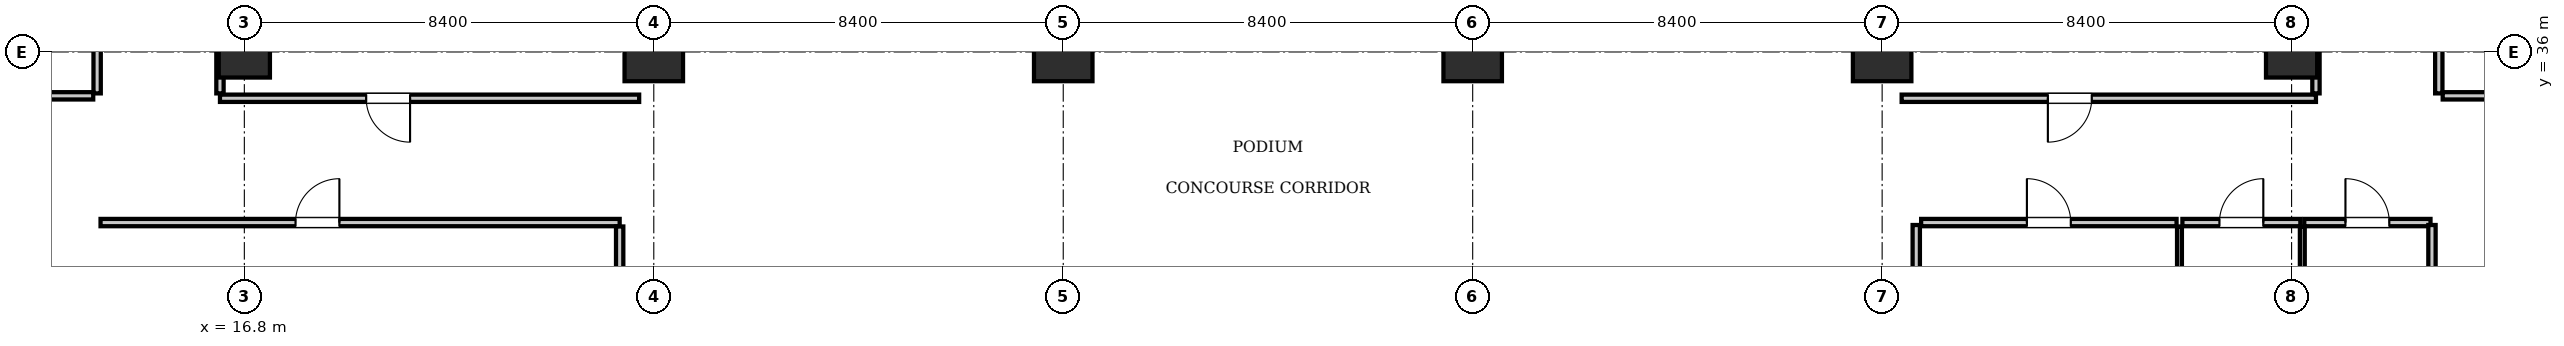
"""IFC4 building model, lengths in metres.
Left out: names, types, materials, properties, quantities, classifications, styles, units other than length and angle.
Written with IfcOpenShell. Run it as: python <this file> out.ifc"""

import sys

from ifc_helpers import new_model, si_unit, direction, frame, frame_2d, origin, origin_2d, place, context, subcontext, project, spatial, rectangle, extrude, element, fill, save


model = new_model("IFC4")
c1 = context("Model", 3, precision=1e-05, world=origin(), true_north=direction((0.0, 1.0)))
c2 = subcontext(c1, "Body", "Model", "MODEL_VIEW")
j1 = project(units=[si_unit("LENGTHUNIT", "METRE"), si_unit("PLANEANGLEUNIT", "RADIAN")], contexts=[c1])
p1 = place(None, origin())
s1 = spatial("IfcSite", under=j1, at=p1, CompositionType="ELEMENT")
p2 = place(p1, origin())
s2 = spatial("IfcBuilding", under=s1, at=p2, CompositionType="ELEMENT")
p3 = place(p2, frame((0.0, 0.0, 5.6)))
s3 = spatial("IfcBuildingStorey", under=s2, at=p3, CompositionType="ELEMENT", Elevation=5.6)
for number, where, z_axis, x_axis in (
    (1, (25.2, 36.0, 0.0), (0.0, 0.0, 1.0), (1.0, 0.0, 0.0)),
    (2, (33.6, 36.0, 0.0), (0.0, 0.0, 1.0), (1.0, 0.0, 0.0)),
    (3, (42.0, 36.0, 0.0), (0.0, 0.0, 1.0), (1.0, 0.0, 0.0)),
    (4, (50.4, 36.0, 0.0), (0.0, 0.0, 1.0), (1.0, 0.0, 0.0)),
):
    element("IfcColumn", number, at=place(p3, frame(where, z_axis=z_axis, x_axis=x_axis)), inside=s3, PredefinedType="COLUMN", context=c2, shape_type="SweptSolid", body=[
        extrude(rectangle(XDim=1.2, YDim=1.2, at=origin_2d()), origin(), (0.0, 0.0, 1.0), 5.25),
    ])
for number, where, z_axis, x_axis in (
    (5, (16.8, 36.0, 0.0), (0.0, 0.0, 1.0), (1.0, 0.0, 0.0)),
    (6, (58.8, 36.0, 0.0), (0.0, 0.0, 1.0), (1.0, 0.0, 0.0)),
):
    element("IfcColumn", number, at=place(p3, frame(where, z_axis=z_axis, x_axis=x_axis)), inside=s3, PredefinedType="COLUMN", context=c2, shape_type="SweptSolid", body=[
        extrude(rectangle(XDim=1.05, YDim=1.05, at=origin_2d()), origin(), (0.0, 0.0, 1.0), 5.25),
    ])
p4 = place(p3, frame((13.85, 32.5, 0.0), z_axis=(0.0, 0.0, 1.0), x_axis=(1.0, 0.0, 0.0)))
e7 = element("IfcWall", 7, at=p4, inside=s3, PredefinedType="PARTITIONING", context=c2, shape_type="SweptSolid", body=[
    extrude(rectangle(XDim=10.65, YDim=0.15, at=frame_2d((5.325, 0.0))), origin(), (0.0, 0.0, 1.0), 4.97),
])
p5 = place(p4, frame((4.0, 0.0, 0.0)))
e8 = element("IfcOpeningElement", 8, at=p5, cuts=e7, PredefinedType="OPENING", context=c2, shape_type="SweptSolid", body=[
    extrude(rectangle(XDim=0.9, YDim=2.1, at=frame_2d((0.45, 1.05))), frame((0.0, 0.085, 0.0), z_axis=(0.0, -1.0, 0.0), x_axis=(1.0, 0.0, 0.0)), (0.0, 0.0, 1.0), 0.17),
])
p6 = place(p3, frame((24.5, 18.1, 0.0), z_axis=(0.0, 0.0, 1.0), x_axis=(0.0, 1.0, 0.0)))
e9 = element("IfcWall", 9, at=p6, inside=s3, PredefinedType="PARTITIONING", context=c2, shape_type="SweptSolid", body=[
    extrude(rectangle(XDim=14.32, YDim=0.15, at=frame_2d((7.16, 0.0))), origin(), (0.0, 0.0, 1.0), 4.97),
])
p7 = place(p3, frame((16.3, 35.05, 0.0), z_axis=(0.0, 0.0, 1.0), x_axis=(1.0, 0.0, 0.0)))
e10 = element("IfcWall", 10, at=p7, inside=s3, PredefinedType="PARTITIONING", context=c2, shape_type="SweptSolid", body=[
    extrude(rectangle(XDim=8.6, YDim=0.15, at=frame_2d((4.3, 0.0))), origin(), (0.0, 0.0, 1.0), 4.97),
])
p8 = place(p7, frame((3.0, 0.0, 0.0)))
e11 = element("IfcOpeningElement", 11, at=p8, cuts=e10, PredefinedType="OPENING", context=c2, shape_type="SweptSolid", body=[
    extrude(rectangle(XDim=0.9, YDim=2.1, at=frame_2d((0.45, 1.05))), frame((0.0, 0.085, 0.0), z_axis=(0.0, -1.0, 0.0), x_axis=(1.0, 0.0, 0.0)), (0.0, 0.0, 1.0), 0.17),
])
p9 = place(p3, frame((16.3, 35.15, 0.0), z_axis=(0.0, 0.0, 1.0), x_axis=(0.0, 1.0, 0.0)))
e12 = element("IfcWall", 12, at=p9, inside=s3, PredefinedType="PARTITIONING", context=c2, shape_type="SweptSolid", body=[
    extrude(rectangle(XDim=18.6, YDim=0.15, at=frame_2d((9.3, 0.0))), origin(), (0.0, 0.0, 1.0), 4.97),
])
p10 = place(p3, frame((13.78, 35.15, 0.0), z_axis=(0.0, 0.0, 1.0), x_axis=(0.0, 1.0, 0.0)))
e13 = element("IfcWall", 13, at=p10, inside=s3, PredefinedType="PARTITIONING", context=c2, shape_type="SweptSolid", body=[
    extrude(rectangle(XDim=9.7, YDim=0.15, at=frame_2d((4.85, 0.0))), origin(), (0.0, 0.0, 1.0), 4.97),
])
p11 = place(p10, frame((3.0, 0.0, 0.0)))
e14 = element("IfcOpeningElement", 14, at=p11, cuts=e13, PredefinedType="OPENING", context=c2, shape_type="SweptSolid", body=[
    extrude(rectangle(XDim=0.9, YDim=2.1, at=frame_2d((0.45, 1.05))), frame((0.0, 0.085, 0.0), z_axis=(0.0, -1.0, 0.0), x_axis=(1.0, 0.0, 0.0)), (0.0, 0.0, 1.0), 0.17),
])
p12 = place(p3, frame((4.35, 35.1, 0.0), z_axis=(0.0, 0.0, 1.0), x_axis=(1.0, 0.0, 0.0)))
e15 = element("IfcWall", 15, at=p12, inside=s3, PredefinedType="PARTITIONING", context=c2, shape_type="SweptSolid", body=[
    extrude(rectangle(XDim=9.35, YDim=0.15, at=frame_2d((4.675, 0.0))), origin(), (0.0, 0.0, 1.0), 4.97),
])
p13 = place(p3, frame((51.2, 32.5, 0.0), z_axis=(0.0, 0.0, 1.0), x_axis=(1.0, 0.0, 0.0)))
e16 = element("IfcWall", 16, at=p13, inside=s3, PredefinedType="PARTITIONING", context=c2, shape_type="SweptSolid", body=[
    extrude(rectangle(XDim=5.24, YDim=0.15, at=frame_2d((2.62, 0.0))), origin(), (0.0, 0.0, 1.0), 4.97),
])
p14 = place(p13, frame((2.17, 0.0, 0.0)))
e17 = element("IfcOpeningElement", 17, at=p14, cuts=e16, PredefinedType="OPENING", context=c2, shape_type="SweptSolid", body=[
    extrude(rectangle(XDim=0.9, YDim=2.1, at=frame_2d((0.45, 1.05))), frame((0.0, 0.085, 0.0), z_axis=(0.0, -1.0, 0.0), x_axis=(1.0, 0.0, 0.0)), (0.0, 0.0, 1.0), 0.17),
])
p15 = place(p3, frame((56.56, 32.5, 0.0), z_axis=(0.0, 0.0, 1.0), x_axis=(1.0, 0.0, 0.0)))
e18 = element("IfcWall", 18, at=p15, inside=s3, PredefinedType="PARTITIONING", context=c2, shape_type="SweptSolid", body=[
    extrude(rectangle(XDim=2.42, YDim=0.15, at=frame_2d((1.21, 0.0))), origin(), (0.0, 0.0, 1.0), 4.97),
])
p16 = place(p15, frame((0.76, 0.0, 0.0)))
e19 = element("IfcOpeningElement", 19, at=p16, cuts=e18, PredefinedType="OPENING", context=c2, shape_type="SweptSolid", body=[
    extrude(rectangle(XDim=0.9, YDim=2.1, at=frame_2d((0.45, 1.05))), frame((0.0, 0.085, 0.0), z_axis=(0.0, -1.0, 0.0), x_axis=(1.0, 0.0, 0.0)), (0.0, 0.0, 1.0), 0.17),
])
p17 = place(p3, frame((59.06, 32.5, 0.0), z_axis=(0.0, 0.0, 1.0), x_axis=(1.0, 0.0, 0.0)))
e20 = element("IfcWall", 20, at=p17, inside=s3, PredefinedType="PARTITIONING", context=c2, shape_type="SweptSolid", body=[
    extrude(rectangle(XDim=2.59, YDim=0.15, at=frame_2d((1.295, 0.0))), origin(), (0.0, 0.0, 1.0), 4.97),
])
p18 = place(p17, frame((0.845, 0.0, 0.0)))
e21 = element("IfcOpeningElement", 21, at=p18, cuts=e20, PredefinedType="OPENING", context=c2, shape_type="SweptSolid", body=[
    extrude(rectangle(XDim=0.9, YDim=2.1, at=frame_2d((0.45, 1.05))), frame((0.0, 0.085, 0.0), z_axis=(0.0, -1.0, 0.0), x_axis=(1.0, 0.0, 0.0)), (0.0, 0.0, 1.0), 0.17),
])
for number, where, z_axis, x_axis in (
    (22, (51.1, 26.18, 0.0), (0.0, 0.0, 1.0), (0.0, 1.0, 0.0)),
    (23, (61.68, 26.18, 0.0), (0.0, 0.0, 1.0), (0.0, 1.0, 0.0)),
):
    element("IfcWall", number, at=place(p3, frame(where, z_axis=z_axis, x_axis=x_axis)), inside=s3, PredefinedType="PARTITIONING", context=c2, shape_type="SweptSolid", body=[
        extrude(rectangle(XDim=6.27, YDim=0.15, at=frame_2d((3.135, 0.0))), origin(), (0.0, 0.0, 1.0), 4.97),
    ])
for number, where, z_axis, x_axis in (
    (24, (56.5, 26.18, 0.0), (0.0, 0.0, 1.0), (0.0, 1.0, 0.0)),
    (25, (59.02, 26.18, 0.0), (0.0, 0.0, 1.0), (0.0, 1.0, 0.0)),
):
    element("IfcWall", number, at=place(p3, frame(where, z_axis=z_axis, x_axis=x_axis)), inside=s3, PredefinedType="PARTITIONING", context=c2, shape_type="SweptSolid", body=[
        extrude(rectangle(XDim=6.24, YDim=0.1, at=frame_2d((3.12, 0.0))), origin(), (0.0, 0.0, 1.0), 4.97),
    ])
p19 = place(p3, frame((50.8, 35.05, 0.0), z_axis=(0.0, 0.0, 1.0), x_axis=(1.0, 0.0, 0.0)))
e26 = element("IfcWall", 26, at=p19, inside=s3, PredefinedType="PARTITIONING", context=c2, shape_type="SweptSolid", body=[
    extrude(rectangle(XDim=8.5, YDim=0.15, at=frame_2d((4.25, 0.0))), origin(), (0.0, 0.0, 1.0), 4.97),
])
p20 = place(p19, frame((3.0, 0.0, 0.0)))
e27 = element("IfcOpeningElement", 27, at=p20, cuts=e26, PredefinedType="OPENING", context=c2, shape_type="SweptSolid", body=[
    extrude(rectangle(XDim=0.9, YDim=2.1, at=frame_2d((0.45, 1.05))), frame((0.0, 0.085, 0.0), z_axis=(0.0, -1.0, 0.0), x_axis=(1.0, 0.0, 0.0)), (0.0, 0.0, 1.0), 0.17),
])
p21 = place(p3, frame((59.3, 35.15, 0.0), z_axis=(0.0, 0.0, 1.0), x_axis=(0.0, 1.0, 0.0)))
e28 = element("IfcWall", 28, at=p21, inside=s3, PredefinedType="PARTITIONING", context=c2, shape_type="SweptSolid", body=[
    extrude(rectangle(XDim=18.6, YDim=0.15, at=frame_2d((9.3, 0.0))), origin(), (0.0, 0.0, 1.0), 4.97),
])
p22 = place(p3, frame((61.82, 35.15, 0.0), z_axis=(0.0, 0.0, 1.0), x_axis=(0.0, 1.0, 0.0)))
e29 = element("IfcWall", 29, at=p22, inside=s3, PredefinedType="PARTITIONING", context=c2, shape_type="SweptSolid", body=[
    extrude(rectangle(XDim=9.7, YDim=0.15, at=frame_2d((4.85, 0.0))), origin(), (0.0, 0.0, 1.0), 4.97),
])
p23 = place(p22, frame((3.0, 0.0, 0.0)))
e30 = element("IfcOpeningElement", 30, at=p23, cuts=e29, PredefinedType="OPENING", context=c2, shape_type="SweptSolid", body=[
    extrude(rectangle(XDim=0.9, YDim=2.1, at=frame_2d((0.45, 1.05))), frame((0.0, 0.085, 0.0), z_axis=(0.0, -1.0, 0.0), x_axis=(1.0, 0.0, 0.0)), (0.0, 0.0, 1.0), 0.17),
])
p24 = place(p3, frame((61.9, 35.1, 0.0), z_axis=(0.0, 0.0, 1.0), x_axis=(1.0, 0.0, 0.0)))
e31 = element("IfcWall", 31, at=p24, inside=s3, PredefinedType="PARTITIONING", context=c2, shape_type="SweptSolid", body=[
    extrude(rectangle(XDim=9.35, YDim=0.15, at=frame_2d((4.675, 0.0))), origin(), (0.0, 0.0, 1.0), 4.97),
])
p25 = place(p5, origin())
e32 = element("IfcDoor", 32, at=p25, inside=s3, OperationType="SINGLE_SWING_RIGHT", PredefinedType="DOOR", context=c2, shape_type="SweptSolid", body=[
    extrude(rectangle(XDim=0.9, YDim=2.1, at=frame_2d((0.45, 1.05))), frame((0.0, 0.025, 0.0), z_axis=(0.0, -1.0, 0.0), x_axis=(1.0, 0.0, 0.0)), (0.0, 0.0, 1.0), 0.05),
])
fill(e8, e32)
p26 = place(p8, frame((0.9, 0.0, 0.0), z_axis=(0.0, 0.0, 1.0), x_axis=(-1.0, 0.0, 0.0)))
e33 = element("IfcDoor", 33, at=p26, inside=s3, OperationType="SINGLE_SWING_LEFT", PredefinedType="DOOR", context=c2, shape_type="SweptSolid", body=[
    extrude(rectangle(XDim=0.9, YDim=2.1, at=frame_2d((0.45, 1.05))), frame((0.0, 0.025, 0.0), z_axis=(0.0, -1.0, 0.0), x_axis=(1.0, 0.0, 0.0)), (0.0, 0.0, 1.0), 0.05),
])
fill(e11, e33)
p27 = place(p14, origin())
e34 = element("IfcDoor", 34, at=p27, inside=s3, OperationType="SINGLE_SWING_LEFT", PredefinedType="DOOR", context=c2, shape_type="SweptSolid", body=[
    extrude(rectangle(XDim=0.9, YDim=2.1, at=frame_2d((0.45, 1.05))), frame((0.0, 0.025, 0.0), z_axis=(0.0, -1.0, 0.0), x_axis=(1.0, 0.0, 0.0)), (0.0, 0.0, 1.0), 0.05),
])
fill(e17, e34)
p28 = place(p16, origin())
e35 = element("IfcDoor", 35, at=p28, inside=s3, OperationType="SINGLE_SWING_RIGHT", PredefinedType="DOOR", context=c2, shape_type="SweptSolid", body=[
    extrude(rectangle(XDim=0.9, YDim=2.1, at=frame_2d((0.45, 1.05))), frame((0.0, 0.025, 0.0), z_axis=(0.0, -1.0, 0.0), x_axis=(1.0, 0.0, 0.0)), (0.0, 0.0, 1.0), 0.05),
])
fill(e19, e35)
p29 = place(p18, origin())
e36 = element("IfcDoor", 36, at=p29, inside=s3, OperationType="SINGLE_SWING_LEFT", PredefinedType="DOOR", context=c2, shape_type="SweptSolid", body=[
    extrude(rectangle(XDim=0.9, YDim=2.1, at=frame_2d((0.45, 1.05))), frame((0.0, 0.025, 0.0), z_axis=(0.0, -1.0, 0.0), x_axis=(1.0, 0.0, 0.0)), (0.0, 0.0, 1.0), 0.05),
])
fill(e21, e36)
p30 = place(p20, frame((0.9, 0.0, 0.0), z_axis=(0.0, 0.0, 1.0), x_axis=(-1.0, 0.0, 0.0)))
e37 = element("IfcDoor", 37, at=p30, inside=s3, OperationType="SINGLE_SWING_RIGHT", PredefinedType="DOOR", context=c2, shape_type="SweptSolid", body=[
    extrude(rectangle(XDim=0.9, YDim=2.1, at=frame_2d((0.45, 1.05))), frame((0.0, 0.025, 0.0), z_axis=(0.0, -1.0, 0.0), x_axis=(1.0, 0.0, 0.0)), (0.0, 0.0, 1.0), 0.05),
])
fill(e27, e37)
save(model, sys.argv[1])
